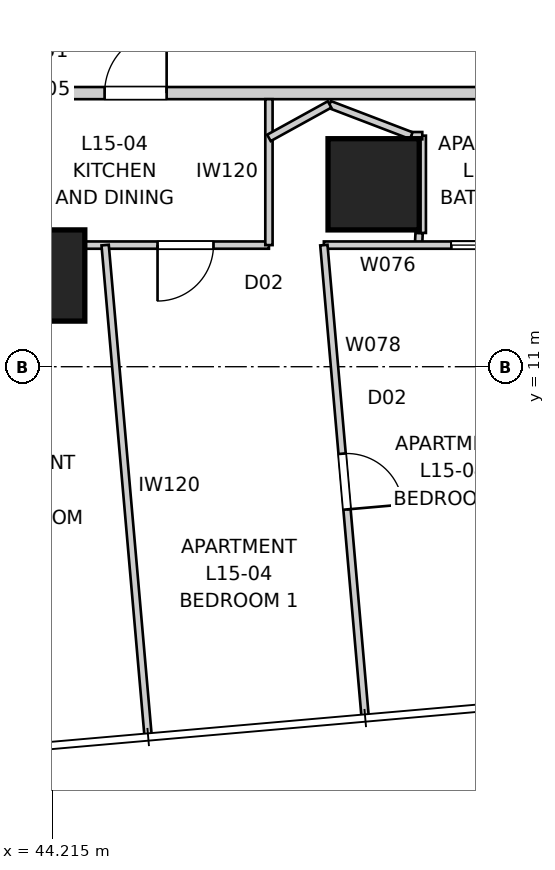
"""IFC4 building model, lengths in metres.
Left out: names, types, materials, properties, quantities, classifications, styles, units other than length and angle.
Written with IfcOpenShell. Run it as: python <this file> out.ifc"""

import sys

from ifc_helpers import new_model, si_unit, direction, frame, frame_2d, origin, origin_2d, place, context, subcontext, project, spatial, rectangle, extrude, element, fill, save


model = new_model("IFC4")
c1 = context("Model", 3, precision=1e-05, world=origin(), true_north=direction((0.0, 1.0)))
c2 = subcontext(c1, "Body", "Model", "MODEL_VIEW")
j1 = project(units=[si_unit("LENGTHUNIT", "METRE"), si_unit("PLANEANGLEUNIT", "RADIAN")], contexts=[c1])
p1 = place(None, origin())
s1 = spatial("IfcSite", under=j1, at=p1, CompositionType="ELEMENT")
p2 = place(p1, origin())
s2 = spatial("IfcBuilding", under=s1, at=p2, CompositionType="ELEMENT")
p3 = place(p2, frame((0.0, 0.0, 57.4)))
s3 = spatial("IfcBuildingStorey", under=s2, at=p3, CompositionType="ELEMENT", Elevation=57.4)
for number, where, z_axis, x_axis in (
    (1, (44.0, 12.5, 0.0), (0.0, 0.0, 1.0), (1.0, 0.0, 0.0)),
    (2, (49.5, 14.0, 0.0), (0.0, 0.0, 1.0), (1.0, 0.0, 0.0)),
):
    element("IfcColumn", number, at=place(p3, frame(where, z_axis=z_axis, x_axis=x_axis)), inside=s3, PredefinedType="COLUMN", context=c2, shape_type="SweptSolid", body=[
        extrude(rectangle(XDim=1.5, YDim=1.5, at=origin_2d()), origin(), (0.0, 0.0, 1.0), 3.4),
    ])
p4 = place(p3, frame((26.3, 15.5, 0.0), z_axis=(0.0, 0.0, 1.0), x_axis=(1.0, 0.0, 0.0)))
e3 = element("IfcWall", 3, at=p4, inside=s3, PredefinedType="PARTITIONING", context=c2, shape_type="SweptSolid", body=[
    extrude(rectangle(XDim=27.4, YDim=0.2, at=frame_2d((13.7, 0.0))), origin(), (0.0, 0.0, 1.0), 3.25),
])
p5 = place(p4, frame((18.776, 0.0, 0.0)))
e4 = element("IfcOpeningElement", 4, at=p5, cuts=e3, PredefinedType="OPENING", context=c2, shape_type="SweptSolid", body=[
    extrude(rectangle(XDim=1.02, YDim=2.34, at=frame_2d((0.51, 1.17))), frame((0.0, 0.11, 0.0), z_axis=(0.0, -1.0, 0.0), x_axis=(1.0, 0.0, 0.0)), (0.0, 0.0, 1.0), 0.22),
])
p6 = place(p4, frame((5.793, 0.0, 0.0)))
e5 = element("IfcOpeningElement", 5, at=p6, cuts=e3, PredefinedType="OPENING", context=c2, shape_type="SweptSolid", body=[
    extrude(rectangle(XDim=1.02, YDim=2.34, at=frame_2d((0.51, 1.17))), frame((0.0, 0.11, 0.0), z_axis=(0.0, -1.0, 0.0), x_axis=(1.0, 0.0, 0.0)), (0.0, 0.0, 1.0), 0.22),
])
p7 = place(p3, frame((47.778, 13.0, 0.0), z_axis=(0.0, 0.0, 1.0), x_axis=(-1.0, 0.0, 0.0)))
e6 = element("IfcWall", 6, at=p7, inside=s3, PredefinedType="PARTITIONING", context=c2, shape_type="SweptSolid", body=[
    extrude(rectangle(XDim=17.082, YDim=0.12, at=frame_2d((8.541, 0.0))), origin(), (0.0, 0.0, 1.0), 2.549),
])
p8 = place(p7, frame((0.912, 0.0, 0.0)))
e7 = element("IfcOpeningElement", 7, at=p8, cuts=e6, PredefinedType="OPENING", context=c2, shape_type="SweptSolid", body=[
    extrude(rectangle(XDim=0.92, YDim=2.34, at=frame_2d((0.46, 1.17))), frame((0.0, 0.07, 0.0), z_axis=(0.0, -1.0, 0.0), x_axis=(1.0, 0.0, 0.0)), (0.0, 0.0, 1.0), 0.14),
])
p9 = place(p7, frame((14.798, 0.0, 0.0)))
e8 = element("IfcOpeningElement", 8, at=p9, cuts=e6, PredefinedType="OPENING", context=c2, shape_type="SweptSolid", body=[
    extrude(rectangle(XDim=0.92, YDim=2.34, at=frame_2d((0.46, 1.17))), frame((0.0, 0.07, 0.0), z_axis=(0.0, -1.0, 0.0), x_axis=(1.0, 0.0, 0.0)), (0.0, 0.0, 1.0), 0.14),
])
p10 = place(p7, frame((4.858, 0.0, 0.0)))
e9 = element("IfcOpeningElement", 9, at=p10, cuts=e6, PredefinedType="OPENING", context=c2, shape_type="SweptSolid", body=[
    extrude(rectangle(XDim=0.96, YDim=2.1, at=frame_2d((0.48, 1.05))), frame((0.0, 0.07, 0.0), z_axis=(0.0, -1.0, 0.0), x_axis=(1.0, 0.0, 0.0)), (0.0, 0.0, 1.0), 0.14),
])
p11 = place(p7, frame((7.635, 0.0, 0.0)))
e10 = element("IfcOpeningElement", 10, at=p11, cuts=e6, PredefinedType="OPENING", context=c2, shape_type="SweptSolid", body=[
    extrude(rectangle(XDim=0.96, YDim=2.1, at=frame_2d((0.48, 1.05))), frame((0.0, 0.07, 0.0), z_axis=(0.0, -1.0, 0.0), x_axis=(1.0, 0.0, 0.0)), (0.0, 0.0, 1.0), 0.14),
])
p12 = place(p3, frame((47.778, 15.4, 0.0), z_axis=(0.0, 0.0, 1.0), x_axis=(0.0, -1.0, 0.0)))
e11 = element("IfcWall", 11, at=p12, inside=s3, PredefinedType="PARTITIONING", context=c2, shape_type="SweptSolid", body=[
    extrude(rectangle(XDim=2.4, YDim=0.12, at=frame_2d((1.2, 0.0))), origin(), (0.0, 0.0, 1.0), 3.25),
])
p13 = place(p3, frame((50.239, 13.0, 0.0), z_axis=(0.0, 0.0, 1.0), x_axis=(0.045131013234, 0.99898107672, 0.0)))
e12 = element("IfcWall", 12, at=p13, inside=s3, PredefinedType="PARTITIONING", context=c2, shape_type="SweptSolid", body=[
    extrude(rectangle(XDim=0.2, YDim=0.12, at=frame_2d((0.1, 0.0))), origin(), (0.0, 0.0, 1.0), 3.25),
])
p14 = place(p3, frame((50.3, 13.2, 0.0), z_axis=(0.0, 0.0, 1.0), x_axis=(0.0, 1.0, 0.0)))
e13 = element("IfcWall", 13, at=p14, inside=s3, PredefinedType="PARTITIONING", context=c2, shape_type="SweptSolid", body=[
    extrude(rectangle(XDim=1.6, YDim=0.12, at=frame_2d((0.8, 0.0))), origin(), (0.0, 0.0, 1.0), 3.25),
])
p15 = place(p3, frame((50.119, 14.8, 0.0), z_axis=(0.0, 0.0, 1.0), x_axis=(-0.934135067997, 0.356919703488, 0.0)))
e14 = element("IfcWall", 14, at=p15, inside=s3, PredefinedType="PARTITIONING", context=c2, shape_type="SweptSolid", body=[
    extrude(rectangle(XDim=1.438, YDim=0.12, at=frame_2d((0.719, 0.0))), origin(), (0.0, 0.0, 1.0), 3.25),
])
p16 = place(p3, frame((48.775, 15.313, 0.0), z_axis=(0.0, 0.0, 1.0), x_axis=(-0.875508887439, -0.483202015741, 0.0)))
e15 = element("IfcWall", 15, at=p16, inside=s3, PredefinedType="PARTITIONING", context=c2, shape_type="SweptSolid", body=[
    extrude(rectangle(XDim=1.139, YDim=0.12, at=frame_2d((0.569, 0.0))), origin(), (0.0, 0.0, 1.0), 3.25),
])
p17 = place(p3, frame((56.2, 13.0, 0.0), z_axis=(0.0, 0.0, 1.0), x_axis=(-1.0, 0.0, 0.0)))
e16 = element("IfcWall", 16, at=p17, inside=s3, PredefinedType="PARTITIONING", context=c2, shape_type="SweptSolid", body=[
    extrude(rectangle(XDim=7.519, YDim=0.12, at=frame_2d((3.759, 0.0))), origin(), (0.0, 0.0, 1.0), 3.25),
])
p18 = place(p17, frame((1.618, 0.0, 0.0)))
e17 = element("IfcOpeningElement", 17, at=p18, cuts=e16, PredefinedType="OPENING", context=c2, shape_type="SweptSolid", body=[
    extrude(rectangle(XDim=0.96, YDim=2.1, at=frame_2d((0.48, 1.05))), frame((0.0, 0.07, 0.0), z_axis=(0.0, -1.0, 0.0), x_axis=(1.0, 0.0, 0.0)), (0.0, 0.0, 1.0), 0.14),
])
p19 = place(p17, frame((4.461, 0.0, 0.0)))
e18 = element("IfcOpeningElement", 18, at=p19, cuts=e16, PredefinedType="OPENING", context=c2, shape_type="SweptSolid", body=[
    extrude(rectangle(XDim=0.96, YDim=2.1, at=frame_2d((0.48, 1.05))), frame((0.0, 0.07, 0.0), z_axis=(0.0, -1.0, 0.0), x_axis=(1.0, 0.0, 0.0)), (0.0, 0.0, 1.0), 0.14),
])
p20 = place(p3, frame((45.084, 13.0, 0.0), z_axis=(0.0, 0.0, 1.0), x_axis=(0.087184938313, -0.99619214338, 0.0)))
e19 = element("IfcWall", 19, at=p20, inside=s3, PredefinedType="PARTITIONING", context=c2, shape_type="SweptSolid", body=[
    extrude(rectangle(XDim=8.082, YDim=0.12, at=frame_2d((4.041, 0.0))), origin(), (0.0, 0.0, 1.0), 3.25),
])
p21 = place(p3, frame((48.681, 13.0, 0.0), z_axis=(0.0, 0.0, 1.0), x_axis=(0.0871517452, -0.996195047824, 0.0)))
e20 = element("IfcWall", 20, at=p21, inside=s3, PredefinedType="PARTITIONING", context=c2, shape_type="SweptSolid", body=[
    extrude(rectangle(XDim=7.768, YDim=0.12, at=frame_2d((3.884, 0.0))), origin(), (0.0, 0.0, 1.0), 3.25),
])
p22 = place(p21, frame((3.444, 0.0, 0.0)))
e21 = element("IfcOpeningElement", 21, at=p22, cuts=e20, PredefinedType="OPENING", context=c2, shape_type="SweptSolid", body=[
    extrude(rectangle(XDim=0.92, YDim=2.34, at=frame_2d((0.46, 1.17))), frame((0.0, 0.07, 0.0), z_axis=(0.0, -1.0, 0.0), x_axis=(1.0, 0.0, 0.0)), (0.0, 0.0, 1.0), 0.14),
])
p23 = place(p3, frame((50.3, 14.8, 0.0), z_axis=(0.0, 0.0, 1.0), x_axis=(-1.0, 0.0, 0.0)))
e22 = element("IfcWall", 22, at=p23, inside=s3, PredefinedType="PARTITIONING", context=c2, shape_type="SweptSolid", body=[
    extrude(rectangle(XDim=0.181, YDim=0.12, at=frame_2d((0.09, 0.0))), origin(), (0.0, 0.0, 1.0), 3.25),
])
p24 = place(p5, origin())
e23 = element("IfcDoor", 23, at=p24, inside=s3, OperationType="SINGLE_SWING_RIGHT", PredefinedType="DOOR", context=c2, shape_type="SweptSolid", body=[
    extrude(rectangle(XDim=1.02, YDim=2.34, at=frame_2d((0.51, 1.17))), frame((0.0, 0.025, 0.0), z_axis=(0.0, -1.0, 0.0), x_axis=(1.0, 0.0, 0.0)), (0.0, 0.0, 1.0), 0.05),
])
fill(e4, e23)
p25 = place(p8, origin())
e24 = element("IfcDoor", 24, at=p25, inside=s3, OperationType="SINGLE_SWING_RIGHT", PredefinedType="DOOR", context=c2, shape_type="SweptSolid", body=[
    extrude(rectangle(XDim=0.92, YDim=2.34, at=frame_2d((0.46, 1.17))), frame((0.0, 0.025, 0.0), z_axis=(0.0, -1.0, 0.0), x_axis=(1.0, 0.0, 0.0)), (0.0, 0.0, 1.0), 0.05),
])
fill(e7, e24)
p26 = place(p22, origin())
e25 = element("IfcDoor", 25, at=p26, inside=s3, OperationType="SINGLE_SWING_RIGHT", PredefinedType="DOOR", context=c2, shape_type="SweptSolid", body=[
    extrude(rectangle(XDim=0.92, YDim=2.34, at=frame_2d((0.46, 1.17))), frame((0.0, 0.025, 0.0), z_axis=(0.0, -1.0, 0.0), x_axis=(1.0, 0.0, 0.0)), (0.0, 0.0, 1.0), 0.05),
])
fill(e21, e25)
p27 = place(p19, origin())
e26 = element("IfcDoor", 26, at=p27, inside=s3, OperationType="SLIDING_TO_LEFT", PredefinedType="DOOR", context=c2, shape_type="SweptSolid", body=[
    extrude(rectangle(XDim=0.96, YDim=2.1, at=frame_2d((0.48, 1.05))), frame((0.0, 0.025, 0.0), z_axis=(0.0, -1.0, 0.0), x_axis=(1.0, 0.0, 0.0)), (0.0, 0.0, 1.0), 0.05),
])
fill(e18, e26)
save(model, sys.argv[1])
